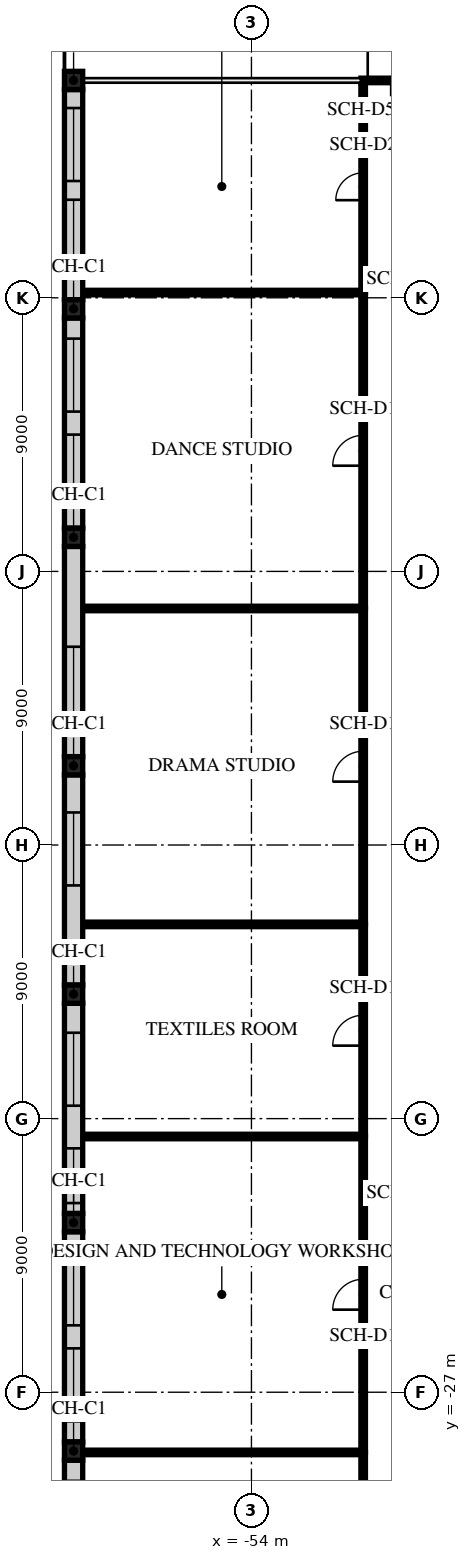
"""IFC4 building model, lengths in metres.
Left out: names, types, materials, properties, quantities, classifications, styles, units other than length and angle.
Written with IfcOpenShell. Run it as: python <this file> out.ifc"""

import sys

from ifc_helpers import new_model, si_unit, direction, frame, frame_2d, origin, origin_2d, place, context, subcontext, project, spatial, rectangle, extrude, element, fill, save


model = new_model("IFC4")
c1 = context("Model", 3, precision=1e-05, world=origin(), true_north=direction((0.0, 1.0)))
c2 = subcontext(c1, "Body", "Model", "MODEL_VIEW")
j1 = project(units=[si_unit("LENGTHUNIT", "METRE"), si_unit("PLANEANGLEUNIT", "RADIAN")], contexts=[c1])
p1 = place(None, origin())
s1 = spatial("IfcSite", under=j1, at=p1, CompositionType="ELEMENT")
p2 = place(p1, origin())
s2 = spatial("IfcBuilding", under=s1, at=p2, CompositionType="ELEMENT")
p3 = place(p2, origin())
s3 = spatial("IfcBuildingStorey", under=s2, at=p3, CompositionType="ELEMENT", Elevation=0.0)
for number, where, z_axis, x_axis in (
    (1, (-59.85, -28.936, -0.2), (0.0, 0.0, 1.0), (1.0, 0.0, 0.0)),
    (2, (-59.85, -21.421, -0.2), (0.0, 0.0, 1.0), (1.0, 0.0, 0.0)),
    (3, (-59.85, -13.907, -0.2), (0.0, 0.0, 1.0), (1.0, 0.0, 0.0)),
    (4, (-59.85, -6.393, -0.2), (0.0, 0.0, 1.0), (1.0, 0.0, 0.0)),
    (5, (-59.85, 1.121, -0.2), (0.0, 0.0, 1.0), (1.0, 0.0, 0.0)),
    (6, (-59.85, 8.636, -0.2), (0.0, 0.0, 1.0), (1.0, 0.0, 0.0)),
    (7, (-59.85, 16.15, -0.2), (0.0, 0.0, 1.0), (1.0, 0.0, 0.0)),
):
    element("IfcColumn", number, at=place(p3, frame(where, z_axis=z_axis, x_axis=x_axis)), inside=s3, PredefinedType="COLUMN", context=c2, shape_type="SweptSolid", body=[
        extrude(rectangle(XDim=0.6, YDim=0.6, at=origin_2d()), origin(), (0.0, 0.0, 1.0), 4.7),
    ])
for number, where, z_axis, x_axis in (
    (8, (-59.55, -28.98, 0.0), (0.0, 0.0, 1.0), (1.0, 0.0, 0.0)),
    (9, (-59.55, -18.588, 0.0), (0.0, 0.0, 1.0), (1.0, 0.0, 0.0)),
    (10, (-59.55, -11.611, 0.0), (0.0, 0.0, 1.0), (1.0, 0.0, 0.0)),
    (11, (-59.55, -1.219, 0.0), (0.0, 0.0, 1.0), (1.0, 0.0, 0.0)),
    (12, (-59.55, 9.172, 0.0), (0.0, 0.0, 1.0), (1.0, 0.0, 0.0)),
):
    element("IfcWall", number, at=place(p3, frame(where, z_axis=z_axis, x_axis=x_axis)), inside=s3, PredefinedType="PARTITIONING", context=c2, shape_type="SweptSolid", body=[
        extrude(rectangle(XDim=9.15, YDim=0.15, at=frame_2d((4.575, 0.0))), origin(), (0.0, 0.0, 1.0), 4.1),
    ])
p4 = place(p3, frame((-50.325, -39.371, 0.0), z_axis=(0.0, 0.0, 1.0), x_axis=(0.0, 1.0, 0.0)))
e13 = element("IfcWall", 13, at=p4, inside=s3, PredefinedType="PARTITIONING", context=c2, shape_type="SweptSolid", body=[
    extrude(rectangle(XDim=10.391, YDim=0.15, at=frame_2d((5.196, 0.0))), origin(), (0.0, 0.0, 1.0), 4.1),
])
p5 = place(p4, frame((4.696, 0.0, 0.0)))
e14 = element("IfcOpeningElement", 14, at=p5, cuts=e13, PredefinedType="OPENING", context=c2, shape_type="SweptSolid", body=[
    extrude(rectangle(XDim=1.0, YDim=2.1, at=frame_2d((0.5, 1.05))), frame((0.0, 0.085, 0.0), z_axis=(0.0, -1.0, 0.0), x_axis=(1.0, 0.0, 0.0)), (0.0, 0.0, 1.0), 0.17),
])
p6 = place(p3, frame((-50.325, -28.98, 0.0), z_axis=(0.0, 0.0, 1.0), x_axis=(0.0, 1.0, 0.0)))
e15 = element("IfcWall", 15, at=p6, inside=s3, PredefinedType="PARTITIONING", context=c2, shape_type="SweptSolid", body=[
    extrude(rectangle(XDim=10.392, YDim=0.15, at=frame_2d((5.196, 0.0))), origin(), (0.0, 0.0, 1.0), 4.1),
])
p7 = place(p6, frame((4.696, 0.0, 0.0)))
e16 = element("IfcOpeningElement", 16, at=p7, cuts=e15, PredefinedType="OPENING", context=c2, shape_type="SweptSolid", body=[
    extrude(rectangle(XDim=1.0, YDim=2.1, at=frame_2d((0.5, 1.05))), frame((0.0, 0.085, 0.0), z_axis=(0.0, -1.0, 0.0), x_axis=(1.0, 0.0, 0.0)), (0.0, 0.0, 1.0), 0.17),
])
p8 = place(p3, frame((-50.325, -18.588, 0.0), z_axis=(0.0, 0.0, 1.0), x_axis=(0.0, 1.0, 0.0)))
e17 = element("IfcWall", 17, at=p8, inside=s3, PredefinedType="PARTITIONING", context=c2, shape_type="SweptSolid", body=[
    extrude(rectangle(XDim=6.978, YDim=0.15, at=frame_2d((3.489, 0.0))), origin(), (0.0, 0.0, 1.0), 4.1),
])
p9 = place(p8, frame((2.989, 0.0, 0.0)))
e18 = element("IfcOpeningElement", 18, at=p9, cuts=e17, PredefinedType="OPENING", context=c2, shape_type="SweptSolid", body=[
    extrude(rectangle(XDim=1.0, YDim=2.1, at=frame_2d((0.5, 1.05))), frame((0.0, 0.085, 0.0), z_axis=(0.0, -1.0, 0.0), x_axis=(1.0, 0.0, 0.0)), (0.0, 0.0, 1.0), 0.17),
])
p10 = place(p3, frame((-50.325, -11.611, 0.0), z_axis=(0.0, 0.0, 1.0), x_axis=(0.0, 1.0, 0.0)))
e19 = element("IfcWall", 19, at=p10, inside=s3, PredefinedType="PARTITIONING", context=c2, shape_type="SweptSolid", body=[
    extrude(rectangle(XDim=10.391, YDim=0.15, at=frame_2d((5.196, 0.0))), origin(), (0.0, 0.0, 1.0), 4.1),
])
p11 = place(p10, frame((4.696, 0.0, 0.0)))
e20 = element("IfcOpeningElement", 20, at=p11, cuts=e19, PredefinedType="OPENING", context=c2, shape_type="SweptSolid", body=[
    extrude(rectangle(XDim=1.0, YDim=2.1, at=frame_2d((0.5, 1.05))), frame((0.0, 0.085, 0.0), z_axis=(0.0, -1.0, 0.0), x_axis=(1.0, 0.0, 0.0)), (0.0, 0.0, 1.0), 0.17),
])
p12 = place(p3, frame((-50.325, -1.219, 0.0), z_axis=(0.0, 0.0, 1.0), x_axis=(0.0, 1.0, 0.0)))
e21 = element("IfcWall", 21, at=p12, inside=s3, PredefinedType="PARTITIONING", context=c2, shape_type="SweptSolid", body=[
    extrude(rectangle(XDim=10.392, YDim=0.15, at=frame_2d((5.196, 0.0))), origin(), (0.0, 0.0, 1.0), 4.1),
])
p13 = place(p12, frame((4.696, 0.0, 0.0)))
e22 = element("IfcOpeningElement", 22, at=p13, cuts=e21, PredefinedType="OPENING", context=c2, shape_type="SweptSolid", body=[
    extrude(rectangle(XDim=1.0, YDim=2.1, at=frame_2d((0.5, 1.05))), frame((0.0, 0.085, 0.0), z_axis=(0.0, -1.0, 0.0), x_axis=(1.0, 0.0, 0.0)), (0.0, 0.0, 1.0), 0.17),
])
p14 = place(p3, frame((-50.325, 9.172, 0.0), z_axis=(0.0, 0.0, 1.0), x_axis=(0.0, 1.0, 0.0)))
e23 = element("IfcWall", 23, at=p14, inside=s3, PredefinedType="PARTITIONING", context=c2, shape_type="SweptSolid", body=[
    extrude(rectangle(XDim=6.903, YDim=0.15, at=frame_2d((3.451, 0.0))), origin(), (0.0, 0.0, 1.0), 4.1),
])
p15 = place(p14, frame((3.039, 0.0, 0.0)))
e24 = element("IfcOpeningElement", 24, at=p15, cuts=e23, PredefinedType="OPENING", context=c2, shape_type="SweptSolid", body=[
    extrude(rectangle(XDim=0.9, YDim=2.1, at=frame_2d((0.45, 1.05))), frame((0.0, 0.085, 0.0), z_axis=(0.0, -1.0, 0.0), x_axis=(1.0, 0.0, 0.0)), (0.0, 0.0, 1.0), 0.17),
])
p16 = place(p3, frame((-59.85, -36.15, -0.2), z_axis=(0.0, 0.0, 1.0), x_axis=(0.0, 1.0, 0.0)))
e25 = element("IfcWall", 25, at=p16, inside=s3, PredefinedType="STANDARD", context=c2, shape_type="SweptSolid", body=[
    extrude(rectangle(XDim=6.914, YDim=0.6, at=frame_2d((3.457, 0.0))), origin(), (0.0, 0.0, 1.0), 4.3),
])
p17 = place(p16, frame((0.679, 0.0, 1.1)))
e26 = element("IfcOpeningElement", 26, at=p17, cuts=e25, PredefinedType="OPENING", context=c2, shape_type="SweptSolid", body=[
    extrude(rectangle(XDim=2.4, YDim=2.1, at=frame_2d((1.2, 1.05))), frame((0.0, 0.31, 0.0), z_axis=(0.0, -1.0, 0.0), x_axis=(1.0, 0.0, 0.0)), (0.0, 0.0, 1.0), 0.62),
])
p18 = place(p16, frame((3.836, 0.0, 1.1)))
e27 = element("IfcOpeningElement", 27, at=p18, cuts=e25, PredefinedType="OPENING", context=c2, shape_type="SweptSolid", body=[
    extrude(rectangle(XDim=2.4, YDim=2.1, at=frame_2d((1.2, 1.05))), frame((0.0, 0.31, 0.0), z_axis=(0.0, -1.0, 0.0), x_axis=(1.0, 0.0, 0.0)), (0.0, 0.0, 1.0), 0.62),
])
p19 = place(p3, frame((-59.85, -28.636, -0.2), z_axis=(0.0, 0.0, 1.0), x_axis=(0.0, 1.0, 0.0)))
e28 = element("IfcWall", 28, at=p19, inside=s3, PredefinedType="STANDARD", context=c2, shape_type="SweptSolid", body=[
    extrude(rectangle(XDim=6.914, YDim=0.6, at=frame_2d((3.457, 0.0))), origin(), (0.0, 0.0, 1.0), 4.3),
])
p20 = place(p19, frame((0.679, 0.0, 1.1)))
e29 = element("IfcOpeningElement", 29, at=p20, cuts=e28, PredefinedType="OPENING", context=c2, shape_type="SweptSolid", body=[
    extrude(rectangle(XDim=2.4, YDim=2.1, at=frame_2d((1.2, 1.05))), frame((0.0, 0.31, 0.0), z_axis=(0.0, -1.0, 0.0), x_axis=(1.0, 0.0, 0.0)), (0.0, 0.0, 1.0), 0.62),
])
p21 = place(p19, frame((3.836, 0.0, 1.1)))
e30 = element("IfcOpeningElement", 30, at=p21, cuts=e28, PredefinedType="OPENING", context=c2, shape_type="SweptSolid", body=[
    extrude(rectangle(XDim=2.4, YDim=2.1, at=frame_2d((1.2, 1.05))), frame((0.0, 0.31, 0.0), z_axis=(0.0, -1.0, 0.0), x_axis=(1.0, 0.0, 0.0)), (0.0, 0.0, 1.0), 0.62),
])
p22 = place(p3, frame((-59.85, -21.121, -0.2), z_axis=(0.0, 0.0, 1.0), x_axis=(0.0, 1.0, 0.0)))
e31 = element("IfcWall", 31, at=p22, inside=s3, PredefinedType="STANDARD", context=c2, shape_type="SweptSolid", body=[
    extrude(rectangle(XDim=6.914, YDim=0.6, at=frame_2d((3.457, 0.0))), origin(), (0.0, 0.0, 1.0), 4.3),
])
p23 = place(p22, frame((0.344, 0.0, 1.1)))
e32 = element("IfcOpeningElement", 32, at=p23, cuts=e31, PredefinedType="OPENING", context=c2, shape_type="SweptSolid", body=[
    extrude(rectangle(XDim=1.8, YDim=2.1, at=frame_2d((0.9, 1.05))), frame((0.0, 0.31, 0.0), z_axis=(0.0, -1.0, 0.0), x_axis=(1.0, 0.0, 0.0)), (0.0, 0.0, 1.0), 0.62),
])
p24 = place(p22, frame((3.546, 0.0, 1.1)))
e33 = element("IfcOpeningElement", 33, at=p24, cuts=e31, PredefinedType="OPENING", context=c2, shape_type="SweptSolid", body=[
    extrude(rectangle(XDim=2.4, YDim=2.1, at=frame_2d((1.2, 1.05))), frame((0.0, 0.31, 0.0), z_axis=(0.0, -1.0, 0.0), x_axis=(1.0, 0.0, 0.0)), (0.0, 0.0, 1.0), 0.62),
])
p25 = place(p3, frame((-59.85, -13.607, -0.2), z_axis=(0.0, 0.0, 1.0), x_axis=(0.0, 1.0, 0.0)))
e34 = element("IfcWall", 34, at=p25, inside=s3, PredefinedType="STANDARD", context=c2, shape_type="SweptSolid", body=[
    extrude(rectangle(XDim=6.914, YDim=0.6, at=frame_2d((3.457, 0.0))), origin(), (0.0, 0.0, 1.0), 4.3),
])
p26 = place(p25, frame((3.278, 0.0, 1.1)))
e35 = element("IfcOpeningElement", 35, at=p26, cuts=e34, PredefinedType="OPENING", context=c2, shape_type="SweptSolid", body=[
    extrude(rectangle(XDim=2.4, YDim=2.1, at=frame_2d((1.2, 1.05))), frame((0.0, 0.31, 0.0), z_axis=(0.0, -1.0, 0.0), x_axis=(1.0, 0.0, 0.0)), (0.0, 0.0, 1.0), 0.62),
])
p27 = place(p3, frame((-59.85, -6.093, -0.2), z_axis=(0.0, 0.0, 1.0), x_axis=(0.0, 1.0, 0.0)))
e36 = element("IfcWall", 36, at=p27, inside=s3, PredefinedType="STANDARD", context=c2, shape_type="SweptSolid", body=[
    extrude(rectangle(XDim=6.914, YDim=0.6, at=frame_2d((3.457, 0.0))), origin(), (0.0, 0.0, 1.0), 4.3),
])
p28 = place(p27, frame((1.214, 0.0, 1.1)))
e37 = element("IfcOpeningElement", 37, at=p28, cuts=e36, PredefinedType="OPENING", context=c2, shape_type="SweptSolid", body=[
    extrude(rectangle(XDim=2.4, YDim=2.1, at=frame_2d((1.2, 1.05))), frame((0.0, 0.31, 0.0), z_axis=(0.0, -1.0, 0.0), x_axis=(1.0, 0.0, 0.0)), (0.0, 0.0, 1.0), 0.62),
])
p29 = place(p3, frame((-59.85, 1.421, -0.2), z_axis=(0.0, 0.0, 1.0), x_axis=(0.0, 1.0, 0.0)))
e38 = element("IfcWall", 38, at=p29, inside=s3, PredefinedType="STANDARD", context=c2, shape_type="SweptSolid", body=[
    extrude(rectangle(XDim=6.914, YDim=0.6, at=frame_2d((3.457, 0.0))), origin(), (0.0, 0.0, 1.0), 4.3),
])
p30 = place(p29, frame((0.679, 0.0, 1.1)))
e39 = element("IfcOpeningElement", 39, at=p30, cuts=e38, PredefinedType="OPENING", context=c2, shape_type="SweptSolid", body=[
    extrude(rectangle(XDim=2.4, YDim=2.1, at=frame_2d((1.2, 1.05))), frame((0.0, 0.31, 0.0), z_axis=(0.0, -1.0, 0.0), x_axis=(1.0, 0.0, 0.0)), (0.0, 0.0, 1.0), 0.62),
])
p31 = place(p29, frame((3.836, 0.0, 1.1)))
e40 = element("IfcOpeningElement", 40, at=p31, cuts=e38, PredefinedType="OPENING", context=c2, shape_type="SweptSolid", body=[
    extrude(rectangle(XDim=2.4, YDim=2.1, at=frame_2d((1.2, 1.05))), frame((0.0, 0.31, 0.0), z_axis=(0.0, -1.0, 0.0), x_axis=(1.0, 0.0, 0.0)), (0.0, 0.0, 1.0), 0.62),
])
p32 = place(p3, frame((-59.85, 8.936, -0.2), z_axis=(0.0, 0.0, 1.0), x_axis=(0.0, 1.0, 0.0)))
e41 = element("IfcWall", 41, at=p32, inside=s3, PredefinedType="STANDARD", context=c2, shape_type="SweptSolid", body=[
    extrude(rectangle(XDim=6.914, YDim=0.6, at=frame_2d((3.457, 0.0))), origin(), (0.0, 0.0, 1.0), 4.3),
])
p33 = place(p32, frame((0.89, 0.0, 1.1)))
e42 = element("IfcOpeningElement", 42, at=p33, cuts=e41, PredefinedType="OPENING", context=c2, shape_type="SweptSolid", body=[
    extrude(rectangle(XDim=2.4, YDim=2.1, at=frame_2d((1.2, 1.05))), frame((0.0, 0.31, 0.0), z_axis=(0.0, -1.0, 0.0), x_axis=(1.0, 0.0, 0.0)), (0.0, 0.0, 1.0), 0.62),
])
p34 = place(p32, frame((3.906, 0.0, 1.1)))
e43 = element("IfcOpeningElement", 43, at=p34, cuts=e41, PredefinedType="OPENING", context=c2, shape_type="SweptSolid", body=[
    extrude(rectangle(XDim=2.4, YDim=2.1, at=frame_2d((1.2, 1.05))), frame((0.0, 0.31, 0.0), z_axis=(0.0, -1.0, 0.0), x_axis=(1.0, 0.0, 0.0)), (0.0, 0.0, 1.0), 0.62),
])
p35 = place(p3, frame((-50.4, 16.15, 0.0), z_axis=(0.0, 0.0, 1.0), x_axis=(1.0, 0.0, 0.0)))
e44 = element("IfcWall", 44, at=p35, inside=s3, PredefinedType="PARTITIONING", context=c2, shape_type="SweptSolid", body=[
    extrude(rectangle(XDim=1.95, YDim=0.15, at=frame_2d((0.975, 0.0))), origin(), (0.0, 0.0, 1.0), 4.1),
])
p36 = place(p35, frame((0.225, 0.0, 0.0)))
e45 = element("IfcOpeningElement", 45, at=p36, cuts=e44, PredefinedType="OPENING", context=c2, shape_type="SweptSolid", body=[
    extrude(rectangle(XDim=1.5, YDim=2.4, at=frame_2d((0.75, 1.2))), frame((0.0, 0.085, 0.0), z_axis=(0.0, -1.0, 0.0), x_axis=(1.0, 0.0, 0.0)), (0.0, 0.0, 1.0), 0.17),
])
p37 = place(p7, origin())
e46 = element("IfcDoor", 46, at=p37, inside=s3, OperationType="SINGLE_SWING_LEFT", PredefinedType="DOOR", context=c2, shape_type="SweptSolid", body=[
    extrude(rectangle(XDim=1.0, YDim=2.1, at=frame_2d((0.5, 1.05))), frame((0.0, 0.025, 0.0), z_axis=(0.0, -1.0, 0.0), x_axis=(1.0, 0.0, 0.0)), (0.0, 0.0, 1.0), 0.05),
])
fill(e16, e46)
p38 = place(p9, origin())
e47 = element("IfcDoor", 47, at=p38, inside=s3, OperationType="SINGLE_SWING_RIGHT", PredefinedType="DOOR", context=c2, shape_type="SweptSolid", body=[
    extrude(rectangle(XDim=1.0, YDim=2.1, at=frame_2d((0.5, 1.05))), frame((0.0, 0.025, 0.0), z_axis=(0.0, -1.0, 0.0), x_axis=(1.0, 0.0, 0.0)), (0.0, 0.0, 1.0), 0.05),
])
fill(e18, e47)
p39 = place(p11, origin())
e48 = element("IfcDoor", 48, at=p39, inside=s3, OperationType="SINGLE_SWING_LEFT", PredefinedType="DOOR", context=c2, shape_type="SweptSolid", body=[
    extrude(rectangle(XDim=1.0, YDim=2.1, at=frame_2d((0.5, 1.05))), frame((0.0, 0.025, 0.0), z_axis=(0.0, -1.0, 0.0), x_axis=(1.0, 0.0, 0.0)), (0.0, 0.0, 1.0), 0.05),
])
fill(e20, e48)
p40 = place(p13, origin())
e49 = element("IfcDoor", 49, at=p40, inside=s3, OperationType="SINGLE_SWING_RIGHT", PredefinedType="DOOR", context=c2, shape_type="SweptSolid", body=[
    extrude(rectangle(XDim=1.0, YDim=2.1, at=frame_2d((0.5, 1.05))), frame((0.0, 0.025, 0.0), z_axis=(0.0, -1.0, 0.0), x_axis=(1.0, 0.0, 0.0)), (0.0, 0.0, 1.0), 0.05),
])
fill(e22, e49)
p41 = place(p15, origin())
e50 = element("IfcDoor", 50, at=p41, inside=s3, OperationType="SINGLE_SWING_LEFT", PredefinedType="DOOR", context=c2, shape_type="SweptSolid", body=[
    extrude(rectangle(XDim=0.9, YDim=2.1, at=frame_2d((0.45, 1.05))), frame((0.0, 0.025, 0.0), z_axis=(0.0, -1.0, 0.0), x_axis=(1.0, 0.0, 0.0)), (0.0, 0.0, 1.0), 0.05),
])
fill(e24, e50)
p42 = place(p20, origin())
e51 = element("IfcWindow", 51, at=p42, inside=s3, PartitioningType="SINGLE_PANEL", PredefinedType="WINDOW", context=c2, shape_type="SweptSolid", body=[
    extrude(rectangle(XDim=2.4, YDim=2.1, at=frame_2d((1.2, 1.05))), frame((0.0, 0.03, 0.0), z_axis=(0.0, -1.0, 0.0), x_axis=(1.0, 0.0, 0.0)), (0.0, 0.0, 1.0), 0.06),
])
fill(e29, e51)
p43 = place(p21, origin())
e52 = element("IfcWindow", 52, at=p43, inside=s3, PartitioningType="SINGLE_PANEL", PredefinedType="WINDOW", context=c2, shape_type="SweptSolid", body=[
    extrude(rectangle(XDim=2.4, YDim=2.1, at=frame_2d((1.2, 1.05))), frame((0.0, 0.03, 0.0), z_axis=(0.0, -1.0, 0.0), x_axis=(1.0, 0.0, 0.0)), (0.0, 0.0, 1.0), 0.06),
])
fill(e30, e52)
p44 = place(p23, origin())
e53 = element("IfcWindow", 53, at=p44, inside=s3, PartitioningType="SINGLE_PANEL", PredefinedType="WINDOW", context=c2, shape_type="SweptSolid", body=[
    extrude(rectangle(XDim=1.8, YDim=2.1, at=frame_2d((0.9, 1.05))), frame((0.0, 0.03, 0.0), z_axis=(0.0, -1.0, 0.0), x_axis=(1.0, 0.0, 0.0)), (0.0, 0.0, 1.0), 0.06),
])
fill(e32, e53)
p45 = place(p24, origin())
e54 = element("IfcWindow", 54, at=p45, inside=s3, PartitioningType="SINGLE_PANEL", PredefinedType="WINDOW", context=c2, shape_type="SweptSolid", body=[
    extrude(rectangle(XDim=2.4, YDim=2.1, at=frame_2d((1.2, 1.05))), frame((0.0, 0.03, 0.0), z_axis=(0.0, -1.0, 0.0), x_axis=(1.0, 0.0, 0.0)), (0.0, 0.0, 1.0), 0.06),
])
fill(e33, e54)
p46 = place(p26, origin())
e55 = element("IfcWindow", 55, at=p46, inside=s3, PartitioningType="SINGLE_PANEL", PredefinedType="WINDOW", context=c2, shape_type="SweptSolid", body=[
    extrude(rectangle(XDim=2.4, YDim=2.1, at=frame_2d((1.2, 1.05))), frame((0.0, 0.03, 0.0), z_axis=(0.0, -1.0, 0.0), x_axis=(1.0, 0.0, 0.0)), (0.0, 0.0, 1.0), 0.06),
])
fill(e35, e55)
p47 = place(p28, origin())
e56 = element("IfcWindow", 56, at=p47, inside=s3, PartitioningType="SINGLE_PANEL", PredefinedType="WINDOW", context=c2, shape_type="SweptSolid", body=[
    extrude(rectangle(XDim=2.4, YDim=2.1, at=frame_2d((1.2, 1.05))), frame((0.0, 0.03, 0.0), z_axis=(0.0, -1.0, 0.0), x_axis=(1.0, 0.0, 0.0)), (0.0, 0.0, 1.0), 0.06),
])
fill(e37, e56)
p48 = place(p30, origin())
e57 = element("IfcWindow", 57, at=p48, inside=s3, PartitioningType="SINGLE_PANEL", PredefinedType="WINDOW", context=c2, shape_type="SweptSolid", body=[
    extrude(rectangle(XDim=2.4, YDim=2.1, at=frame_2d((1.2, 1.05))), frame((0.0, 0.03, 0.0), z_axis=(0.0, -1.0, 0.0), x_axis=(1.0, 0.0, 0.0)), (0.0, 0.0, 1.0), 0.06),
])
fill(e39, e57)
p49 = place(p31, origin())
e58 = element("IfcWindow", 58, at=p49, inside=s3, PartitioningType="SINGLE_PANEL", PredefinedType="WINDOW", context=c2, shape_type="SweptSolid", body=[
    extrude(rectangle(XDim=2.4, YDim=2.1, at=frame_2d((1.2, 1.05))), frame((0.0, 0.03, 0.0), z_axis=(0.0, -1.0, 0.0), x_axis=(1.0, 0.0, 0.0)), (0.0, 0.0, 1.0), 0.06),
])
fill(e40, e58)
p50 = place(p33, origin())
e59 = element("IfcWindow", 59, at=p50, inside=s3, PartitioningType="SINGLE_PANEL", PredefinedType="WINDOW", context=c2, shape_type="SweptSolid", body=[
    extrude(rectangle(XDim=2.4, YDim=2.1, at=frame_2d((1.2, 1.05))), frame((0.0, 0.03, 0.0), z_axis=(0.0, -1.0, 0.0), x_axis=(1.0, 0.0, 0.0)), (0.0, 0.0, 1.0), 0.06),
])
fill(e42, e59)
p51 = place(p34, origin())
e60 = element("IfcWindow", 60, at=p51, inside=s3, PartitioningType="SINGLE_PANEL", PredefinedType="WINDOW", context=c2, shape_type="SweptSolid", body=[
    extrude(rectangle(XDim=2.4, YDim=2.1, at=frame_2d((1.2, 1.05))), frame((0.0, 0.03, 0.0), z_axis=(0.0, -1.0, 0.0), x_axis=(1.0, 0.0, 0.0)), (0.0, 0.0, 1.0), 0.06),
])
fill(e43, e60)
p52 = place(p36, origin())
e61 = element("IfcDoor", 61, at=p52, inside=s3, OperationType="DOUBLE_DOOR_SINGLE_SWING", PredefinedType="DOOR", context=c2, shape_type="SweptSolid", body=[
    extrude(rectangle(XDim=1.5, YDim=2.4, at=frame_2d((0.75, 1.2))), frame((0.0, 0.025, 0.0), z_axis=(0.0, -1.0, 0.0), x_axis=(1.0, 0.0, 0.0)), (0.0, 0.0, 1.0), 0.05),
])
fill(e45, e61)
save(model, sys.argv[1])
